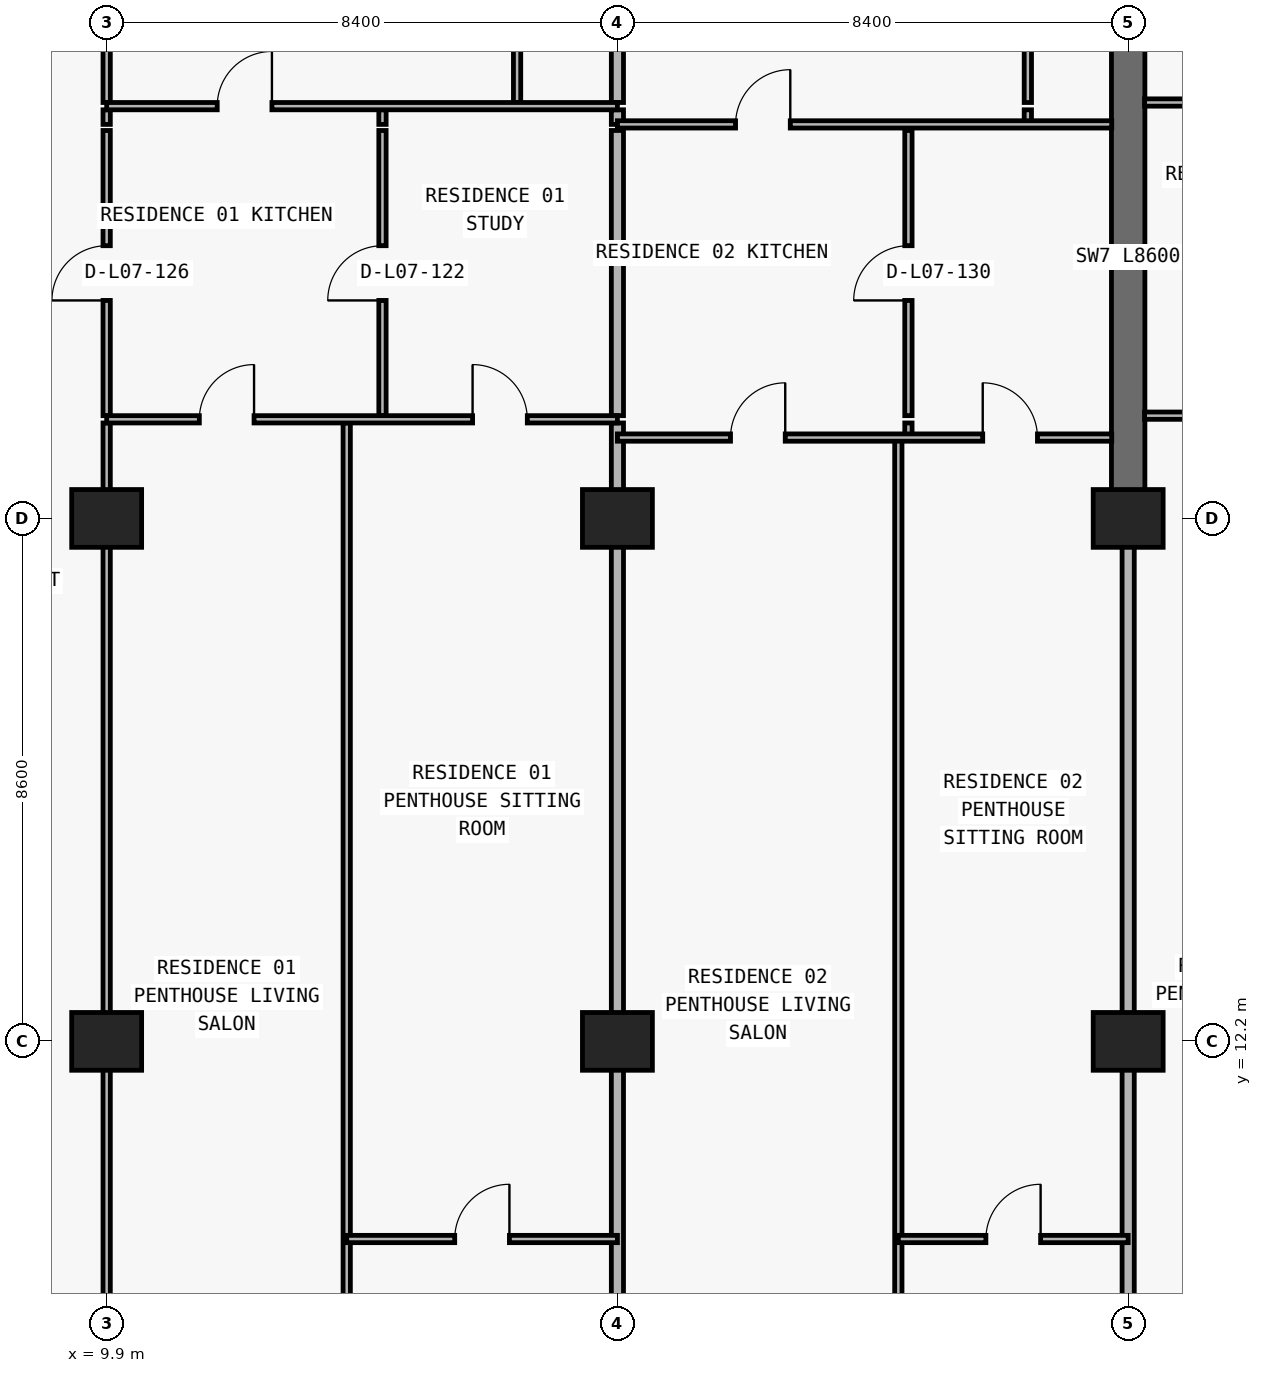
"""IFC4 building model, lengths in metres.
Left out: names, types, materials, properties, quantities, classifications, styles, units other than length and angle.
Written with IfcOpenShell. Run it as: python <this file> out.ifc"""

import sys

from ifc_helpers import new_model, si_unit, direction, frame, frame_2d, origin, origin_2d, place, context, subcontext, project, spatial, rectangle, extrude, element, fill, save


model = new_model("IFC4")
c1 = context("Model", 3, precision=1e-05, world=origin(), true_north=direction((0.0, 1.0)))
c2 = subcontext(c1, "Body", "Model", "MODEL_VIEW")
j1 = project(units=[si_unit("LENGTHUNIT", "METRE"), si_unit("PLANEANGLEUNIT", "RADIAN")], contexts=[c1])
p1 = place(None, origin())
s1 = spatial("IfcSite", under=j1, at=p1, CompositionType="ELEMENT")
p2 = place(p1, origin())
s2 = spatial("IfcBuilding", under=s1, at=p2, CompositionType="ELEMENT")
p3 = place(p2, frame((0.0, 0.0, 33.3)))
s3 = spatial("IfcBuildingStorey", under=s2, at=p3, CompositionType="ELEMENT", Elevation=33.3)
for number, where, z_axis, x_axis in (
    (1, (9.9, 12.2, 0.0), (0.0, 0.0, 1.0), (1.0, 0.0, 0.0)),
    (2, (18.3, 12.2, 0.0), (0.0, 0.0, 1.0), (1.0, 0.0, 0.0)),
    (3, (26.7, 12.2, 0.0), (0.0, 0.0, 1.0), (1.0, 0.0, 0.0)),
    (4, (9.9, 20.8, 0.0), (0.0, 0.0, 1.0), (1.0, 0.0, 0.0)),
    (5, (18.3, 20.8, 0.0), (0.0, 0.0, 1.0), (1.0, 0.0, 0.0)),
    (6, (26.7, 20.8, 0.0), (0.0, 0.0, 1.0), (1.0, 0.0, 0.0)),
):
    element("IfcColumn", number, at=place(p3, frame(where, z_axis=z_axis, x_axis=x_axis)), inside=s3, PredefinedType="COLUMN", context=c2, shape_type="SweptSolid", body=[
        extrude(rectangle(XDim=1.15, YDim=0.95, at=origin_2d()), origin(), (0.0, 0.0, 1.0), 3.05),
    ])
p4 = place(p3, frame((26.7, 20.8, 0.0), z_axis=(0.0, 0.0, 1.0), x_axis=(0.0, 1.0, 0.0)))
e7 = element("IfcWall", 7, at=p4, inside=s3, PredefinedType="SHEAR", context=c2, shape_type="SweptSolid", body=[
    extrude(rectangle(XDim=8.6, YDim=0.55, at=frame_2d((4.3, 0.0))), origin(), (0.0, 0.0, 1.0), 3.05),
])
p5 = place(p3, frame((9.9, 6.24, 0.0), z_axis=(0.0, 0.0, 1.0), x_axis=(0.0, 1.0, 0.0)))
e8 = element("IfcWall", 8, at=p5, inside=s3, PredefinedType="PARTITIONING", context=c2, shape_type="SweptSolid", body=[
    extrude(rectangle(XDim=16.13, YDim=0.12, at=frame_2d((8.065, 0.0))), origin(), (0.0, 0.0, 1.0), 2.11),
])
p6 = place(p3, frame((9.9, 22.49, 0.0), z_axis=(0.0, 0.0, 1.0), x_axis=(0.0, 1.0, 0.0)))
e9 = element("IfcWall", 9, at=p6, inside=s3, PredefinedType="PARTITIONING", context=c2, shape_type="SweptSolid", body=[
    extrude(rectangle(XDim=4.69, YDim=0.12, at=frame_2d((2.345, 0.0))), origin(), (0.0, 0.0, 1.0), 2.11),
])
p7 = place(p6, frame((1.895, 0.0, 0.0)))
e10 = element("IfcOpeningElement", 10, at=p7, cuts=e9, PredefinedType="OPENING", context=c2, shape_type="SweptSolid", body=[
    extrude(rectangle(XDim=0.9, YDim=2.06, at=frame_2d((0.45, 1.03))), frame((0.0, 0.07, 0.0), z_axis=(0.0, -1.0, 0.0), x_axis=(1.0, 0.0, 0.0)), (0.0, 0.0, 1.0), 0.14),
])
p8 = place(p3, frame((9.9, 27.28, 0.0), z_axis=(0.0, 0.0, 1.0), x_axis=(0.0, 1.0, 0.0)))
e11 = element("IfcWall", 11, at=p8, inside=s3, PredefinedType="PARTITIONING", context=c2, shape_type="SweptSolid", body=[
    extrude(rectangle(XDim=0.24, YDim=0.12, at=frame_2d((0.12, 0.0))), origin(), (0.0, 0.0, 1.0), 2.11),
])
p9 = place(p3, frame((9.9, 27.64, 0.0), z_axis=(0.0, 0.0, 1.0), x_axis=(0.0, 1.0, 0.0)))
e12 = element("IfcWall", 12, at=p9, inside=s3, PredefinedType="PARTITIONING", context=c2, shape_type="SweptSolid", body=[
    extrude(rectangle(XDim=6.86, YDim=0.12, at=frame_2d((3.43, 0.0))), origin(), (0.0, 0.0, 1.0), 2.11),
])
p10 = place(p3, frame((13.848, 6.24, 0.0), z_axis=(0.0, 0.0, 1.0), x_axis=(0.0, 1.0, 0.0)))
e13 = element("IfcWall", 13, at=p10, inside=s3, PredefinedType="PARTITIONING", context=c2, shape_type="SweptSolid", body=[
    extrude(rectangle(XDim=16.13, YDim=0.12, at=frame_2d((8.065, 0.0))), origin(), (0.0, 0.0, 1.0), 3.05),
])
p11 = place(p3, frame((14.436, 22.49, 0.0), z_axis=(0.0, 0.0, 1.0), x_axis=(0.0, 1.0, 0.0)))
e14 = element("IfcWall", 14, at=p11, inside=s3, PredefinedType="PARTITIONING", context=c2, shape_type="SweptSolid", body=[
    extrude(rectangle(XDim=4.69, YDim=0.12, at=frame_2d((2.345, 0.0))), origin(), (0.0, 0.0, 1.0), 3.05),
])
p12 = place(p11, frame((1.895, 0.0, 0.0)))
e15 = element("IfcOpeningElement", 15, at=p12, cuts=e14, PredefinedType="OPENING", context=c2, shape_type="SweptSolid", body=[
    extrude(rectangle(XDim=0.9, YDim=2.15, at=frame_2d((0.45, 1.075))), frame((0.0, 0.07, 0.0), z_axis=(0.0, -1.0, 0.0), x_axis=(1.0, 0.0, 0.0)), (0.0, 0.0, 1.0), 0.14),
])
p13 = place(p3, frame((14.436, 27.28, 0.0), z_axis=(0.0, 0.0, 1.0), x_axis=(0.0, 1.0, 0.0)))
e16 = element("IfcWall", 16, at=p13, inside=s3, PredefinedType="PARTITIONING", context=c2, shape_type="SweptSolid", body=[
    extrude(rectangle(XDim=0.24, YDim=0.12, at=frame_2d((0.12, 0.0))), origin(), (0.0, 0.0, 1.0), 3.05),
])
p14 = place(p3, frame((16.65, 27.64, 0.0), z_axis=(0.0, 0.0, 1.0), x_axis=(0.0, 1.0, 0.0)))
e17 = element("IfcWall", 17, at=p14, inside=s3, PredefinedType="PARTITIONING", context=c2, shape_type="SweptSolid", body=[
    extrude(rectangle(XDim=6.86, YDim=0.12, at=frame_2d((3.43, 0.0))), origin(), (0.0, 0.0, 1.0), 3.05),
])
p15 = place(p14, frame((3.005, 0.0, 0.0)))
e18 = element("IfcOpeningElement", 18, at=p15, cuts=e17, PredefinedType="OPENING", context=c2, shape_type="SweptSolid", body=[
    extrude(rectangle(XDim=0.85, YDim=2.1, at=frame_2d((0.425, 1.05))), frame((0.0, 0.07, 0.0), z_axis=(0.0, -1.0, 0.0), x_axis=(1.0, 0.0, 0.0)), (0.0, 0.0, 1.0), 0.14),
])
p16 = place(p3, frame((18.3, 6.24, 0.0), z_axis=(0.0, 0.0, 1.0), x_axis=(0.0, 1.0, 0.0)))
e19 = element("IfcWall", 19, at=p16, inside=s3, PredefinedType="PARTITIONING", context=c2, shape_type="SweptSolid", body=[
    extrude(rectangle(XDim=16.13, YDim=0.2, at=frame_2d((8.065, 0.0))), origin(), (0.0, 0.0, 1.0), 2.11),
])
p17 = place(p3, frame((18.3, 22.49, 0.0), z_axis=(0.0, 0.0, 1.0), x_axis=(0.0, 1.0, 0.0)))
e20 = element("IfcWall", 20, at=p17, inside=s3, PredefinedType="PARTITIONING", context=c2, shape_type="SweptSolid", body=[
    extrude(rectangle(XDim=4.69, YDim=0.2, at=frame_2d((2.345, 0.0))), origin(), (0.0, 0.0, 1.0), 2.11),
])
p18 = place(p3, frame((18.3, 27.28, 0.0), z_axis=(0.0, 0.0, 1.0), x_axis=(0.0, 1.0, 0.0)))
e21 = element("IfcWall", 21, at=p18, inside=s3, PredefinedType="PARTITIONING", context=c2, shape_type="SweptSolid", body=[
    extrude(rectangle(XDim=0.24, YDim=0.2, at=frame_2d((0.12, 0.0))), origin(), (0.0, 0.0, 1.0), 2.11),
])
p19 = place(p3, frame((18.3, 27.64, 0.0), z_axis=(0.0, 0.0, 1.0), x_axis=(0.0, 1.0, 0.0)))
e22 = element("IfcWall", 22, at=p19, inside=s3, PredefinedType="PARTITIONING", context=c2, shape_type="SweptSolid", body=[
    extrude(rectangle(XDim=6.86, YDim=0.2, at=frame_2d((3.43, 0.0))), origin(), (0.0, 0.0, 1.0), 2.11),
])
p20 = place(p3, frame((22.92, 6.24, 0.0), z_axis=(0.0, 0.0, 1.0), x_axis=(0.0, 1.0, 0.0)))
e23 = element("IfcWall", 23, at=p20, inside=s3, PredefinedType="PARTITIONING", context=c2, shape_type="SweptSolid", body=[
    extrude(rectangle(XDim=15.89, YDim=0.12, at=frame_2d((7.945, 0.0))), origin(), (0.0, 0.0, 1.0), 3.05),
])
p21 = place(p3, frame((23.086, 22.135, 0.0), z_axis=(0.0, 0.0, 1.0), x_axis=(0.0, 1.0, 0.0)))
e24 = element("IfcWall", 24, at=p21, inside=s3, PredefinedType="PARTITIONING", context=c2, shape_type="SweptSolid", body=[
    extrude(rectangle(XDim=0.235, YDim=0.12, at=frame_2d((0.118, 0.0))), origin(), (0.0, 0.0, 1.0), 3.05),
])
p22 = place(p3, frame((23.086, 22.49, 0.0), z_axis=(0.0, 0.0, 1.0), x_axis=(0.0, 1.0, 0.0)))
e25 = element("IfcWall", 25, at=p22, inside=s3, PredefinedType="PARTITIONING", context=c2, shape_type="SweptSolid", body=[
    extrude(rectangle(XDim=4.69, YDim=0.12, at=frame_2d((2.345, 0.0))), origin(), (0.0, 0.0, 1.0), 3.05),
])
p23 = place(p22, frame((1.895, 0.0, 0.0)))
e26 = element("IfcOpeningElement", 26, at=p23, cuts=e25, PredefinedType="OPENING", context=c2, shape_type="SweptSolid", body=[
    extrude(rectangle(XDim=0.9, YDim=2.15, at=frame_2d((0.45, 1.075))), frame((0.0, 0.07, 0.0), z_axis=(0.0, -1.0, 0.0), x_axis=(1.0, 0.0, 0.0)), (0.0, 0.0, 1.0), 0.14),
])
p24 = place(p3, frame((25.05, 27.28, 0.0), z_axis=(0.0, 0.0, 1.0), x_axis=(0.0, 1.0, 0.0)))
e27 = element("IfcWall", 27, at=p24, inside=s3, PredefinedType="PARTITIONING", context=c2, shape_type="SweptSolid", body=[
    extrude(rectangle(XDim=0.24, YDim=0.12, at=frame_2d((0.12, 0.0))), origin(), (0.0, 0.0, 1.0), 3.05),
])
p25 = place(p3, frame((25.05, 27.64, 0.0), z_axis=(0.0, 0.0, 1.0), x_axis=(0.0, 1.0, 0.0)))
e28 = element("IfcWall", 28, at=p25, inside=s3, PredefinedType="PARTITIONING", context=c2, shape_type="SweptSolid", body=[
    extrude(rectangle(XDim=6.86, YDim=0.12, at=frame_2d((3.43, 0.0))), origin(), (0.0, 0.0, 1.0), 3.05),
])
p26 = place(p25, frame((3.005, 0.0, 0.0)))
e29 = element("IfcOpeningElement", 29, at=p26, cuts=e28, PredefinedType="OPENING", context=c2, shape_type="SweptSolid", body=[
    extrude(rectangle(XDim=0.85, YDim=2.1, at=frame_2d((0.425, 1.05))), frame((0.0, 0.07, 0.0), z_axis=(0.0, -1.0, 0.0), x_axis=(1.0, 0.0, 0.0)), (0.0, 0.0, 1.0), 0.14),
])
p27 = place(p3, frame((26.7, 6.24, 0.0), z_axis=(0.0, 0.0, 1.0), x_axis=(0.0, 1.0, 0.0)))
e30 = element("IfcWall", 30, at=p27, inside=s3, PredefinedType="PARTITIONING", context=c2, shape_type="SweptSolid", body=[
    extrude(rectangle(XDim=14.555, YDim=0.2, at=frame_2d((7.277, 0.0))), origin(), (0.0, 0.0, 1.0), 2.11),
])
p28 = place(p3, frame((13.848, 8.95, 0.0), z_axis=(0.0, 0.0, 1.0), x_axis=(1.0, 0.0, 0.0)))
e31 = element("IfcWall", 31, at=p28, inside=s3, PredefinedType="PARTITIONING", context=c2, shape_type="SweptSolid", body=[
    extrude(rectangle(XDim=4.452, YDim=0.12, at=frame_2d((2.226, 0.0))), origin(), (0.0, 0.0, 1.0), 3.05),
])
p29 = place(p28, frame((1.776, 0.0, 0.0)))
e32 = element("IfcOpeningElement", 32, at=p29, cuts=e31, PredefinedType="OPENING", context=c2, shape_type="SweptSolid", body=[
    extrude(rectangle(XDim=0.9, YDim=2.15, at=frame_2d((0.45, 1.075))), frame((0.0, 0.07, 0.0), z_axis=(0.0, -1.0, 0.0), x_axis=(1.0, 0.0, 0.0)), (0.0, 0.0, 1.0), 0.14),
])
p30 = place(p3, frame((22.92, 8.95, 0.0), z_axis=(0.0, 0.0, 1.0), x_axis=(1.0, 0.0, 0.0)))
e33 = element("IfcWall", 33, at=p30, inside=s3, PredefinedType="PARTITIONING", context=c2, shape_type="SweptSolid", body=[
    extrude(rectangle(XDim=3.78, YDim=0.12, at=frame_2d((1.89, 0.0))), origin(), (0.0, 0.0, 1.0), 3.05),
])
p31 = place(p30, frame((1.44, 0.0, 0.0)))
e34 = element("IfcOpeningElement", 34, at=p31, cuts=e33, PredefinedType="OPENING", context=c2, shape_type="SweptSolid", body=[
    extrude(rectangle(XDim=0.9, YDim=2.15, at=frame_2d((0.45, 1.075))), frame((0.0, 0.07, 0.0), z_axis=(0.0, -1.0, 0.0), x_axis=(1.0, 0.0, 0.0)), (0.0, 0.0, 1.0), 0.14),
])
p32 = place(p3, frame((18.3, 22.13, 0.0), z_axis=(0.0, 0.0, 1.0), x_axis=(1.0, 0.0, 0.0)))
e35 = element("IfcWall", 35, at=p32, inside=s3, PredefinedType="PARTITIONING", context=c2, shape_type="SweptSolid", body=[
    extrude(rectangle(XDim=8.13, YDim=0.12, at=frame_2d((4.065, 0.0))), origin(), (0.0, 0.0, 1.0), 3.05),
])
p33 = place(p32, frame((1.86, 0.0, 0.0)))
e36 = element("IfcOpeningElement", 36, at=p33, cuts=e35, PredefinedType="OPENING", context=c2, shape_type="SweptSolid", body=[
    extrude(rectangle(XDim=0.9, YDim=2.15, at=frame_2d((0.45, 1.075))), frame((0.0, 0.07, 0.0), z_axis=(0.0, -1.0, 0.0), x_axis=(1.0, 0.0, 0.0)), (0.0, 0.0, 1.0), 0.14),
])
p34 = place(p32, frame((6.008, 0.0, 0.0)))
e37 = element("IfcOpeningElement", 37, at=p34, cuts=e35, PredefinedType="OPENING", context=c2, shape_type="SweptSolid", body=[
    extrude(rectangle(XDim=0.9, YDim=2.15, at=frame_2d((0.45, 1.075))), frame((0.0, 0.07, 0.0), z_axis=(0.0, -1.0, 0.0), x_axis=(1.0, 0.0, 0.0)), (0.0, 0.0, 1.0), 0.14),
])
p35 = place(p3, frame((9.9, 22.43, 0.0), z_axis=(0.0, 0.0, 1.0), x_axis=(1.0, 0.0, 0.0)))
e38 = element("IfcWall", 38, at=p35, inside=s3, PredefinedType="PARTITIONING", context=c2, shape_type="SweptSolid", body=[
    extrude(rectangle(XDim=8.4, YDim=0.12, at=frame_2d((4.2, 0.0))), origin(), (0.0, 0.0, 1.0), 3.05),
])
p36 = place(p35, frame((1.524, 0.0, 0.0)))
e39 = element("IfcOpeningElement", 39, at=p36, cuts=e38, PredefinedType="OPENING", context=c2, shape_type="SweptSolid", body=[
    extrude(rectangle(XDim=0.9, YDim=2.15, at=frame_2d((0.45, 1.075))), frame((0.0, 0.07, 0.0), z_axis=(0.0, -1.0, 0.0), x_axis=(1.0, 0.0, 0.0)), (0.0, 0.0, 1.0), 0.14),
])
p37 = place(p35, frame((6.018, 0.0, 0.0)))
e40 = element("IfcOpeningElement", 40, at=p37, cuts=e38, PredefinedType="OPENING", context=c2, shape_type="SweptSolid", body=[
    extrude(rectangle(XDim=0.9, YDim=2.15, at=frame_2d((0.45, 1.075))), frame((0.0, 0.07, 0.0), z_axis=(0.0, -1.0, 0.0), x_axis=(1.0, 0.0, 0.0)), (0.0, 0.0, 1.0), 0.14),
])
p38 = place(p3, frame((26.97, 22.49, 0.0), z_axis=(0.0, 0.0, 1.0), x_axis=(1.0, 0.0, 0.0)))
e41 = element("IfcWall", 41, at=p38, inside=s3, PredefinedType="PARTITIONING", context=c2, shape_type="SweptSolid", body=[
    extrude(rectangle(XDim=8.125, YDim=0.12, at=frame_2d((4.062, 0.0))), origin(), (0.0, 0.0, 1.0), 3.05),
])
p39 = place(p38, frame((1.389, 0.0, 0.0)))
e42 = element("IfcOpeningElement", 42, at=p39, cuts=e41, PredefinedType="OPENING", context=c2, shape_type="SweptSolid", body=[
    extrude(rectangle(XDim=0.9, YDim=2.15, at=frame_2d((0.45, 1.075))), frame((0.0, 0.07, 0.0), z_axis=(0.0, -1.0, 0.0), x_axis=(1.0, 0.0, 0.0)), (0.0, 0.0, 1.0), 0.14),
])
p40 = place(p38, frame((5.621, 0.0, 0.0)))
e43 = element("IfcOpeningElement", 43, at=p40, cuts=e41, PredefinedType="OPENING", context=c2, shape_type="SweptSolid", body=[
    extrude(rectangle(XDim=0.9, YDim=2.15, at=frame_2d((0.45, 1.075))), frame((0.0, 0.07, 0.0), z_axis=(0.0, -1.0, 0.0), x_axis=(1.0, 0.0, 0.0)), (0.0, 0.0, 1.0), 0.14),
])
p41 = place(p3, frame((18.3, 27.28, 0.0), z_axis=(0.0, 0.0, 1.0), x_axis=(1.0, 0.0, 0.0)))
e44 = element("IfcWall", 44, at=p41, inside=s3, PredefinedType="PARTITIONING", context=c2, shape_type="SweptSolid", body=[
    extrude(rectangle(XDim=8.13, YDim=0.12, at=frame_2d((4.065, 0.0))), origin(), (0.0, 0.0, 1.0), 3.05),
])
p42 = place(p41, frame((1.943, 0.0, 0.0)))
e45 = element("IfcOpeningElement", 45, at=p42, cuts=e44, PredefinedType="OPENING", context=c2, shape_type="SweptSolid", body=[
    extrude(rectangle(XDim=0.9, YDim=2.15, at=frame_2d((0.45, 1.075))), frame((0.0, 0.07, 0.0), z_axis=(0.0, -1.0, 0.0), x_axis=(1.0, 0.0, 0.0)), (0.0, 0.0, 1.0), 0.14),
])
p43 = place(p3, frame((9.9, 27.58, 0.0), z_axis=(0.0, 0.0, 1.0), x_axis=(1.0, 0.0, 0.0)))
e46 = element("IfcWall", 46, at=p43, inside=s3, PredefinedType="PARTITIONING", context=c2, shape_type="SweptSolid", body=[
    extrude(rectangle(XDim=8.4, YDim=0.12, at=frame_2d((4.2, 0.0))), origin(), (0.0, 0.0, 1.0), 3.05),
])
p44 = place(p43, frame((1.818, 0.0, 0.0)))
e47 = element("IfcOpeningElement", 47, at=p44, cuts=e46, PredefinedType="OPENING", context=c2, shape_type="SweptSolid", body=[
    extrude(rectangle(XDim=0.9, YDim=2.15, at=frame_2d((0.45, 1.075))), frame((0.0, 0.07, 0.0), z_axis=(0.0, -1.0, 0.0), x_axis=(1.0, 0.0, 0.0)), (0.0, 0.0, 1.0), 0.14),
])
p45 = place(p3, frame((26.97, 27.64, 0.0), z_axis=(0.0, 0.0, 1.0), x_axis=(1.0, 0.0, 0.0)))
e48 = element("IfcWall", 48, at=p45, inside=s3, PredefinedType="PARTITIONING", context=c2, shape_type="SweptSolid", body=[
    extrude(rectangle(XDim=8.13, YDim=0.12, at=frame_2d((4.065, 0.0))), origin(), (0.0, 0.0, 1.0), 3.05),
])
p46 = place(p45, frame((1.558, 0.0, 0.0)))
e49 = element("IfcOpeningElement", 49, at=p46, cuts=e48, PredefinedType="OPENING", context=c2, shape_type="SweptSolid", body=[
    extrude(rectangle(XDim=0.9, YDim=2.15, at=frame_2d((0.45, 1.075))), frame((0.0, 0.07, 0.0), z_axis=(0.0, -1.0, 0.0), x_axis=(1.0, 0.0, 0.0)), (0.0, 0.0, 1.0), 0.14),
])
p47 = place(p44, origin())
e50 = element("IfcDoor", 50, at=p47, inside=s3, OperationType="SINGLE_SWING_RIGHT", PredefinedType="DOOR", context=c2, shape_type="SweptSolid", body=[
    extrude(rectangle(XDim=0.9, YDim=2.15, at=frame_2d((0.45, 1.075))), frame((0.0, 0.025, 0.0), z_axis=(0.0, -1.0, 0.0), x_axis=(1.0, 0.0, 0.0)), (0.0, 0.0, 1.0), 0.05),
])
fill(e47, e50)
p48 = place(p12, origin())
e51 = element("IfcDoor", 51, at=p48, inside=s3, OperationType="SINGLE_SWING_LEFT", PredefinedType="DOOR", context=c2, shape_type="SweptSolid", body=[
    extrude(rectangle(XDim=0.9, YDim=2.15, at=frame_2d((0.45, 1.075))), frame((0.0, 0.025, 0.0), z_axis=(0.0, -1.0, 0.0), x_axis=(1.0, 0.0, 0.0)), (0.0, 0.0, 1.0), 0.05),
])
fill(e15, e51)
p49 = place(p36, origin())
e52 = element("IfcDoor", 52, at=p49, inside=s3, OperationType="SINGLE_SWING_RIGHT", PredefinedType="DOOR", context=c2, shape_type="SweptSolid", body=[
    extrude(rectangle(XDim=0.9, YDim=2.15, at=frame_2d((0.45, 1.075))), frame((0.0, 0.025, 0.0), z_axis=(0.0, -1.0, 0.0), x_axis=(1.0, 0.0, 0.0)), (0.0, 0.0, 1.0), 0.05),
])
fill(e39, e52)
p50 = place(p37, origin())
e53 = element("IfcDoor", 53, at=p50, inside=s3, OperationType="SINGLE_SWING_LEFT", PredefinedType="DOOR", context=c2, shape_type="SweptSolid", body=[
    extrude(rectangle(XDim=0.9, YDim=2.15, at=frame_2d((0.45, 1.075))), frame((0.0, 0.025, 0.0), z_axis=(0.0, -1.0, 0.0), x_axis=(1.0, 0.0, 0.0)), (0.0, 0.0, 1.0), 0.05),
])
fill(e40, e53)
p51 = place(p29, origin())
e54 = element("IfcDoor", 54, at=p51, inside=s3, OperationType="SINGLE_SWING_RIGHT", PredefinedType="DOOR", context=c2, shape_type="SweptSolid", body=[
    extrude(rectangle(XDim=0.9, YDim=2.15, at=frame_2d((0.45, 1.075))), frame((0.0, 0.025, 0.0), z_axis=(0.0, -1.0, 0.0), x_axis=(1.0, 0.0, 0.0)), (0.0, 0.0, 1.0), 0.05),
])
fill(e32, e54)
p52 = place(p7, origin())
e55 = element("IfcDoor", 55, at=p52, inside=s3, OperationType="SINGLE_SWING_LEFT", PredefinedType="DOOR", context=c2, shape_type="SweptSolid", body=[
    extrude(rectangle(XDim=0.9, YDim=2.06, at=frame_2d((0.45, 1.03))), frame((0.0, 0.025, 0.0), z_axis=(0.0, -1.0, 0.0), x_axis=(1.0, 0.0, 0.0)), (0.0, 0.0, 1.0), 0.05),
])
fill(e10, e55)
p53 = place(p42, origin())
e56 = element("IfcDoor", 56, at=p53, inside=s3, OperationType="SINGLE_SWING_RIGHT", PredefinedType="DOOR", context=c2, shape_type="SweptSolid", body=[
    extrude(rectangle(XDim=0.9, YDim=2.15, at=frame_2d((0.45, 1.075))), frame((0.0, 0.025, 0.0), z_axis=(0.0, -1.0, 0.0), x_axis=(1.0, 0.0, 0.0)), (0.0, 0.0, 1.0), 0.05),
])
fill(e45, e56)
p54 = place(p23, origin())
e57 = element("IfcDoor", 57, at=p54, inside=s3, OperationType="SINGLE_SWING_LEFT", PredefinedType="DOOR", context=c2, shape_type="SweptSolid", body=[
    extrude(rectangle(XDim=0.9, YDim=2.15, at=frame_2d((0.45, 1.075))), frame((0.0, 0.025, 0.0), z_axis=(0.0, -1.0, 0.0), x_axis=(1.0, 0.0, 0.0)), (0.0, 0.0, 1.0), 0.05),
])
fill(e26, e57)
p55 = place(p33, origin())
e58 = element("IfcDoor", 58, at=p55, inside=s3, OperationType="SINGLE_SWING_RIGHT", PredefinedType="DOOR", context=c2, shape_type="SweptSolid", body=[
    extrude(rectangle(XDim=0.9, YDim=2.15, at=frame_2d((0.45, 1.075))), frame((0.0, 0.025, 0.0), z_axis=(0.0, -1.0, 0.0), x_axis=(1.0, 0.0, 0.0)), (0.0, 0.0, 1.0), 0.05),
])
fill(e36, e58)
p56 = place(p34, origin())
e59 = element("IfcDoor", 59, at=p56, inside=s3, OperationType="SINGLE_SWING_LEFT", PredefinedType="DOOR", context=c2, shape_type="SweptSolid", body=[
    extrude(rectangle(XDim=0.9, YDim=2.15, at=frame_2d((0.45, 1.075))), frame((0.0, 0.025, 0.0), z_axis=(0.0, -1.0, 0.0), x_axis=(1.0, 0.0, 0.0)), (0.0, 0.0, 1.0), 0.05),
])
fill(e37, e59)
p57 = place(p31, origin())
e60 = element("IfcDoor", 60, at=p57, inside=s3, OperationType="SINGLE_SWING_RIGHT", PredefinedType="DOOR", context=c2, shape_type="SweptSolid", body=[
    extrude(rectangle(XDim=0.9, YDim=2.15, at=frame_2d((0.45, 1.075))), frame((0.0, 0.025, 0.0), z_axis=(0.0, -1.0, 0.0), x_axis=(1.0, 0.0, 0.0)), (0.0, 0.0, 1.0), 0.05),
])
fill(e34, e60)
save(model, sys.argv[1])
